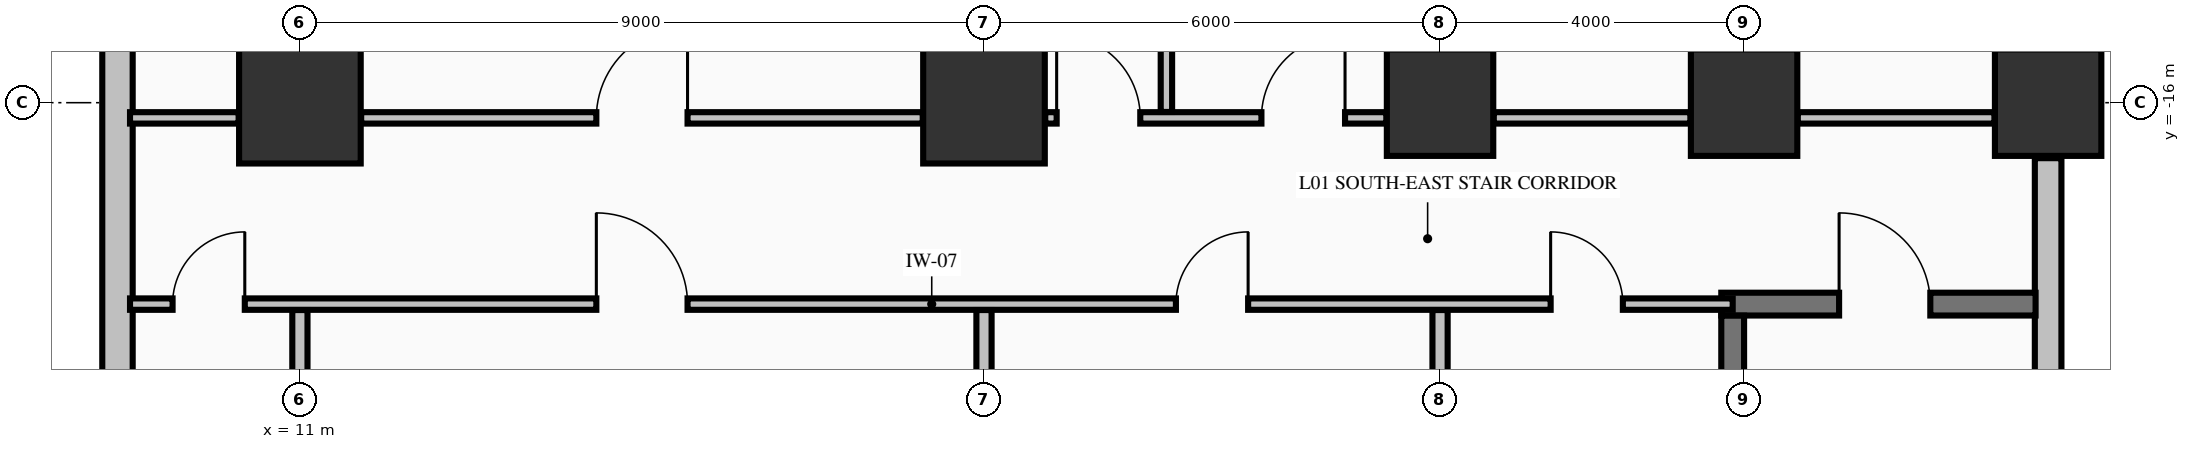
"""IFC4 building model, lengths in metres.
Left out: names, types, materials, properties, quantities, classifications, styles, units other than length and angle.
Written with IfcOpenShell. Run it as: python <this file> out.ifc"""

import sys

from ifc_helpers import new_model, si_unit, direction, frame, frame_2d, origin, origin_2d, place, context, subcontext, project, spatial, rectangle, extrude, element, fill, save


model = new_model("IFC4")
c1 = context("Model", 3, precision=1e-05, world=origin(), true_north=direction((0.0, 1.0)))
c2 = subcontext(c1, "Body", "Model", "MODEL_VIEW")
j1 = project(units=[si_unit("LENGTHUNIT", "METRE"), si_unit("PLANEANGLEUNIT", "RADIAN")], contexts=[c1])
p1 = place(None, origin())
s1 = spatial("IfcSite", under=j1, at=p1, CompositionType="ELEMENT")
p2 = place(p1, origin())
s2 = spatial("IfcBuilding", under=s1, at=p2, CompositionType="ELEMENT")
p3 = place(p2, frame((0.0, 0.0, 5.44)))
s3 = spatial("IfcBuildingStorey", under=s2, at=p3, CompositionType="ELEMENT", Elevation=5.44)
for number, where, z_axis, x_axis in (
    (1, (11.0, -16.0, 0.0), (0.0, 0.0, 1.0), (1.0, 0.0, 0.0)),
    (2, (20.0, -16.0, 0.0), (0.0, 0.0, 1.0), (1.0, 0.0, 0.0)),
):
    element("IfcColumn", number, at=place(p3, frame(where, z_axis=z_axis, x_axis=x_axis)), inside=s3, PredefinedType="COLUMN", context=c2, shape_type="SweptSolid", body=[
        extrude(rectangle(XDim=1.6, YDim=1.6, at=origin_2d()), origin(), (0.0, 0.0, 1.0), 5.09),
    ])
for number, where, z_axis, x_axis in (
    (3, (26.0, -16.0, 0.0), (0.0, 0.0, 1.0), (1.0, 0.0, 0.0)),
    (4, (30.0, -16.0, 0.0), (0.0, 0.0, 1.0), (1.0, 0.0, 0.0)),
    (5, (34.0, -16.0, 0.0), (0.0, 0.0, 1.0), (1.0, 0.0, 0.0)),
):
    element("IfcColumn", number, at=place(p3, frame(where, z_axis=z_axis, x_axis=x_axis)), inside=s3, PredefinedType="COLUMN", context=c2, shape_type="SweptSolid", body=[
        extrude(rectangle(XDim=1.4, YDim=1.4, at=origin_2d()), origin(), (0.0, 0.0, 1.0), 5.09),
    ])
p4 = place(p3, frame((34.0, -16.73, 0.0), z_axis=(0.0, 0.0, 1.0), x_axis=(0.0, -1.0, 0.0)))
e6 = element("IfcWall", 6, at=p4, inside=s3, PredefinedType="STANDARD", context=c2, shape_type="SweptSolid", body=[
    extrude(rectangle(XDim=4.54, YDim=0.35, at=frame_2d((2.27, 0.0))), origin(), (0.0, 0.0, 1.0), 5.09),
])
p5 = place(p3, frame((8.6, -0.65, 0.0), z_axis=(0.0, 0.0, 1.0), x_axis=(0.0, -1.0, 0.0)))
e7 = element("IfcWall", 7, at=p5, inside=s3, PredefinedType="STANDARD", context=c2, shape_type="SweptSolid", body=[
    extrude(rectangle(XDim=24.72, YDim=0.4, at=frame_2d((12.36, 0.0))), origin(), (0.0, 0.0, 1.0), 4.132),
])
p6 = place(p3, frame((29.7, -18.65, 0.0), z_axis=(0.0, 0.0, 1.0), x_axis=(1.0, 0.0, 0.0)))
e8 = element("IfcWall", 8, at=p6, inside=s3, PredefinedType="SHEAR", context=c2, shape_type="SweptSolid", body=[
    extrude(rectangle(XDim=4.135, YDim=0.3, at=frame_2d((2.067, 0.0))), origin(), (0.0, 0.0, 1.0), 5.09),
])
p7 = place(p6, frame((1.55, 0.0, 0.0)))
e9 = element("IfcOpeningElement", 9, at=p7, cuts=e8, PredefinedType="OPENING", context=c2, shape_type="SweptSolid", body=[
    extrude(rectangle(XDim=1.2, YDim=2.15, at=frame_2d((0.6, 1.075))), frame((0.0, 0.16, 0.0), z_axis=(0.0, -1.0, 0.0), x_axis=(1.0, 0.0, 0.0)), (0.0, 0.0, 1.0), 0.32),
])
p8 = place(p3, frame((8.765, -18.65, 0.0), z_axis=(0.0, 0.0, 1.0), x_axis=(1.0, 0.0, 0.0)))
e10 = element("IfcWall", 10, at=p8, inside=s3, PredefinedType="PARTITIONING", context=c2, shape_type="SweptSolid", body=[
    extrude(rectangle(XDim=21.085, YDim=0.15, at=frame_2d((10.542, 0.0))), origin(), (0.0, 0.0, 1.0), 5.09),
])
p9 = place(p8, frame((0.56, 0.0, 0.0)))
e11 = element("IfcOpeningElement", 11, at=p9, cuts=e10, PredefinedType="OPENING", context=c2, shape_type="SweptSolid", body=[
    extrude(rectangle(XDim=0.95, YDim=2.15, at=frame_2d((0.475, 1.075))), frame((0.0, 0.085, 0.0), z_axis=(0.0, -1.0, 0.0), x_axis=(1.0, 0.0, 0.0)), (0.0, 0.0, 1.0), 0.17),
])
p10 = place(p8, frame((6.135, 0.0, 0.0)))
e12 = element("IfcOpeningElement", 12, at=p10, cuts=e10, PredefinedType="OPENING", context=c2, shape_type="SweptSolid", body=[
    extrude(rectangle(XDim=1.2, YDim=2.15, at=frame_2d((0.6, 1.075))), frame((0.0, 0.085, 0.0), z_axis=(0.0, -1.0, 0.0), x_axis=(1.0, 0.0, 0.0)), (0.0, 0.0, 1.0), 0.17),
])
p11 = place(p8, frame((13.76, 0.0, 0.0)))
e13 = element("IfcOpeningElement", 13, at=p11, cuts=e10, PredefinedType="OPENING", context=c2, shape_type="SweptSolid", body=[
    extrude(rectangle(XDim=0.95, YDim=2.15, at=frame_2d((0.475, 1.075))), frame((0.0, 0.085, 0.0), z_axis=(0.0, -1.0, 0.0), x_axis=(1.0, 0.0, 0.0)), (0.0, 0.0, 1.0), 0.17),
])
p12 = place(p8, frame((18.69, 0.0, 0.0)))
e14 = element("IfcOpeningElement", 14, at=p12, cuts=e10, PredefinedType="OPENING", context=c2, shape_type="SweptSolid", body=[
    extrude(rectangle(XDim=0.95, YDim=2.15, at=frame_2d((0.475, 1.075))), frame((0.0, 0.085, 0.0), z_axis=(0.0, -1.0, 0.0), x_axis=(1.0, 0.0, 0.0)), (0.0, 0.0, 1.0), 0.17),
])
p13 = place(p3, frame((8.765, -16.2, 0.0), z_axis=(0.0, 0.0, 1.0), x_axis=(1.0, 0.0, 0.0)))
e15 = element("IfcWall", 15, at=p13, inside=s3, PredefinedType="PARTITIONING", context=c2, shape_type="SweptSolid", body=[
    extrude(rectangle(XDim=1.429, YDim=0.15, at=frame_2d((0.715, 0.0))), origin(), (0.0, 0.0, 1.0), 5.09),
])
p14 = place(p3, frame((11.806, -16.2, 0.0), z_axis=(0.0, 0.0, 1.0), x_axis=(1.0, 0.0, 0.0)))
e16 = element("IfcWall", 16, at=p14, inside=s3, PredefinedType="PARTITIONING", context=c2, shape_type="SweptSolid", body=[
    extrude(rectangle(XDim=7.388, YDim=0.15, at=frame_2d((3.694, 0.0))), origin(), (0.0, 0.0, 1.0), 4.132),
])
p15 = place(p14, frame((3.094, 0.0, 0.0)))
e17 = element("IfcOpeningElement", 17, at=p15, cuts=e16, PredefinedType="OPENING", context=c2, shape_type="SweptSolid", body=[
    extrude(rectangle(XDim=1.2, YDim=2.15, at=frame_2d((0.6, 1.075))), frame((0.0, 0.085, 0.0), z_axis=(0.0, -1.0, 0.0), x_axis=(1.0, 0.0, 0.0)), (0.0, 0.0, 1.0), 0.17),
])
p16 = place(p3, frame((20.806, -16.2, 0.0), z_axis=(0.0, 0.0, 1.0), x_axis=(1.0, 0.0, 0.0)))
e18 = element("IfcWall", 18, at=p16, inside=s3, PredefinedType="PARTITIONING", context=c2, shape_type="SweptSolid", body=[
    extrude(rectangle(XDim=4.488, YDim=0.15, at=frame_2d((2.244, 0.0))), origin(), (0.0, 0.0, 1.0), 4.132),
])
p17 = place(p16, frame((0.15, 0.0, 0.0)))
e19 = element("IfcOpeningElement", 19, at=p17, cuts=e18, PredefinedType="OPENING", context=c2, shape_type="SweptSolid", body=[
    extrude(rectangle(XDim=1.1, YDim=2.15, at=frame_2d((0.55, 1.075))), frame((0.0, 0.085, 0.0), z_axis=(0.0, -1.0, 0.0), x_axis=(1.0, 0.0, 0.0)), (0.0, 0.0, 1.0), 0.17),
])
p18 = place(p16, frame((2.844, 0.0, 0.0)))
e20 = element("IfcOpeningElement", 20, at=p18, cuts=e18, PredefinedType="OPENING", context=c2, shape_type="SweptSolid", body=[
    extrude(rectangle(XDim=1.1, YDim=2.15, at=frame_2d((0.55, 1.075))), frame((0.0, 0.085, 0.0), z_axis=(0.0, -1.0, 0.0), x_axis=(1.0, 0.0, 0.0)), (0.0, 0.0, 1.0), 0.17),
])
for number, where, z_axis, x_axis in (
    (21, (26.706, -16.2, 0.0), (0.0, 0.0, 1.0), (1.0, 0.0, 0.0)),
    (22, (30.706, -16.2, 0.0), (0.0, 0.0, 1.0), (1.0, 0.0, 0.0)),
):
    element("IfcWall", number, at=place(p3, frame(where, z_axis=z_axis, x_axis=x_axis)), inside=s3, PredefinedType="PARTITIONING", context=c2, shape_type="SweptSolid", body=[
        extrude(rectangle(XDim=2.588, YDim=0.15, at=frame_2d((1.294, 0.0))), origin(), (0.0, 0.0, 1.0), 4.132),
    ])
p19 = place(p3, frame((29.85, -28.296, 0.0), z_axis=(0.0, 0.0, 1.0), x_axis=(0.0, 1.0, 0.0)))
e23 = element("IfcWall", 23, at=p19, inside=s3, PredefinedType="SHEAR", context=c2, shape_type="SweptSolid", body=[
    extrude(rectangle(XDim=9.494, YDim=0.3, at=frame_2d((4.747, 0.0))), origin(), (0.0, 0.0, 1.0), 5.09),
])
for number, where, z_axis, x_axis in (
    (24, (11.0, -21.194, 0.0), (0.0, 0.0, 1.0), (0.0, 1.0, 0.0)),
    (25, (20.0, -21.194, 0.0), (0.0, 0.0, 1.0), (0.0, 1.0, 0.0)),
):
    element("IfcWall", number, at=place(p3, frame(where, z_axis=z_axis, x_axis=x_axis)), inside=s3, PredefinedType="PARTITIONING", context=c2, shape_type="SweptSolid", body=[
        extrude(rectangle(XDim=2.466, YDim=0.2, at=frame_2d((1.233, 0.0))), origin(), (0.0, 0.0, 1.0), 4.132),
    ])
p20 = place(p3, frame((22.4, -16.122, 0.0), z_axis=(0.0, 0.0, 1.0), x_axis=(0.0, 1.0, 0.0)))
e26 = element("IfcWall", 26, at=p20, inside=s3, PredefinedType="PARTITIONING", context=c2, shape_type="SweptSolid", body=[
    extrude(rectangle(XDim=32.044, YDim=0.15, at=frame_2d((16.022, 0.0))), origin(), (0.0, 0.0, 1.0), 5.09),
])
p21 = place(p20, frame((10.522, 0.0, 0.0)))
e27 = element("IfcOpeningElement", 27, at=p21, cuts=e26, PredefinedType="OPENING", context=c2, shape_type="SweptSolid", body=[
    extrude(rectangle(XDim=1.2, YDim=2.15, at=frame_2d((0.6, 1.075))), frame((0.0, 0.085, 0.0), z_axis=(0.0, -1.0, 0.0), x_axis=(1.0, 0.0, 0.0)), (0.0, 0.0, 1.0), 0.17),
])
p22 = place(p20, frame((20.522, 0.0, 0.0)))
e28 = element("IfcOpeningElement", 28, at=p22, cuts=e26, PredefinedType="OPENING", context=c2, shape_type="SweptSolid", body=[
    extrude(rectangle(XDim=1.2, YDim=2.15, at=frame_2d((0.6, 1.075))), frame((0.0, 0.085, 0.0), z_axis=(0.0, -1.0, 0.0), x_axis=(1.0, 0.0, 0.0)), (0.0, 0.0, 1.0), 0.17),
])
p23 = place(p3, frame((26.0, -21.294, 0.0), z_axis=(0.0, 0.0, 1.0), x_axis=(0.0, 1.0, 0.0)))
e29 = element("IfcWall", 29, at=p23, inside=s3, PredefinedType="PARTITIONING", context=c2, shape_type="SweptSolid", body=[
    extrude(rectangle(XDim=2.566, YDim=0.2, at=frame_2d((1.283, 0.0))), origin(), (0.0, 0.0, 1.0), 4.132),
])
p24 = place(p7, origin())
e30 = element("IfcDoor", 30, at=p24, inside=s3, OperationType="SINGLE_SWING_LEFT", PredefinedType="DOOR", context=c2, shape_type="SweptSolid", body=[
    extrude(rectangle(XDim=1.2, YDim=2.15, at=frame_2d((0.6, 1.075))), frame((0.0, 0.025, 0.0), z_axis=(0.0, -1.0, 0.0), x_axis=(1.0, 0.0, 0.0)), (0.0, 0.0, 1.0), 0.05),
])
fill(e9, e30)
p25 = place(p15, origin())
e31 = element("IfcDoor", 31, at=p25, inside=s3, OperationType="SINGLE_SWING_RIGHT", PredefinedType="DOOR", context=c2, shape_type="SweptSolid", body=[
    extrude(rectangle(XDim=1.2, YDim=2.15, at=frame_2d((0.6, 1.075))), frame((0.0, 0.025, 0.0), z_axis=(0.0, -1.0, 0.0), x_axis=(1.0, 0.0, 0.0)), (0.0, 0.0, 1.0), 0.05),
])
fill(e17, e31)
p26 = place(p17, origin())
e32 = element("IfcDoor", 32, at=p26, inside=s3, OperationType="SINGLE_SWING_LEFT", PredefinedType="DOOR", context=c2, shape_type="SweptSolid", body=[
    extrude(rectangle(XDim=1.1, YDim=2.15, at=frame_2d((0.55, 1.075))), frame((0.0, 0.025, 0.0), z_axis=(0.0, -1.0, 0.0), x_axis=(1.0, 0.0, 0.0)), (0.0, 0.0, 1.0), 0.05),
])
fill(e19, e32)
p27 = place(p18, origin())
e33 = element("IfcDoor", 33, at=p27, inside=s3, OperationType="SINGLE_SWING_RIGHT", PredefinedType="DOOR", context=c2, shape_type="SweptSolid", body=[
    extrude(rectangle(XDim=1.1, YDim=2.15, at=frame_2d((0.55, 1.075))), frame((0.0, 0.025, 0.0), z_axis=(0.0, -1.0, 0.0), x_axis=(1.0, 0.0, 0.0)), (0.0, 0.0, 1.0), 0.05),
])
fill(e20, e33)
p28 = place(p9, origin())
e34 = element("IfcDoor", 34, at=p28, inside=s3, OperationType="SINGLE_SWING_RIGHT", PredefinedType="DOOR", context=c2, shape_type="SweptSolid", body=[
    extrude(rectangle(XDim=0.95, YDim=2.15, at=frame_2d((0.475, 1.075))), frame((0.0, 0.025, 0.0), z_axis=(0.0, -1.0, 0.0), x_axis=(1.0, 0.0, 0.0)), (0.0, 0.0, 1.0), 0.05),
])
fill(e11, e34)
p29 = place(p10, origin())
e35 = element("IfcDoor", 35, at=p29, inside=s3, OperationType="SINGLE_SWING_LEFT", PredefinedType="DOOR", context=c2, shape_type="SweptSolid", body=[
    extrude(rectangle(XDim=1.2, YDim=2.15, at=frame_2d((0.6, 1.075))), frame((0.0, 0.025, 0.0), z_axis=(0.0, -1.0, 0.0), x_axis=(1.0, 0.0, 0.0)), (0.0, 0.0, 1.0), 0.05),
])
fill(e12, e35)
p30 = place(p11, origin())
e36 = element("IfcDoor", 36, at=p30, inside=s3, OperationType="SINGLE_SWING_RIGHT", PredefinedType="DOOR", context=c2, shape_type="SweptSolid", body=[
    extrude(rectangle(XDim=0.95, YDim=2.15, at=frame_2d((0.475, 1.075))), frame((0.0, 0.025, 0.0), z_axis=(0.0, -1.0, 0.0), x_axis=(1.0, 0.0, 0.0)), (0.0, 0.0, 1.0), 0.05),
])
fill(e13, e36)
p31 = place(p12, origin())
e37 = element("IfcDoor", 37, at=p31, inside=s3, OperationType="SINGLE_SWING_LEFT", PredefinedType="DOOR", context=c2, shape_type="SweptSolid", body=[
    extrude(rectangle(XDim=0.95, YDim=2.15, at=frame_2d((0.475, 1.075))), frame((0.0, 0.025, 0.0), z_axis=(0.0, -1.0, 0.0), x_axis=(1.0, 0.0, 0.0)), (0.0, 0.0, 1.0), 0.05),
])
fill(e14, e37)
save(model, sys.argv[1])
